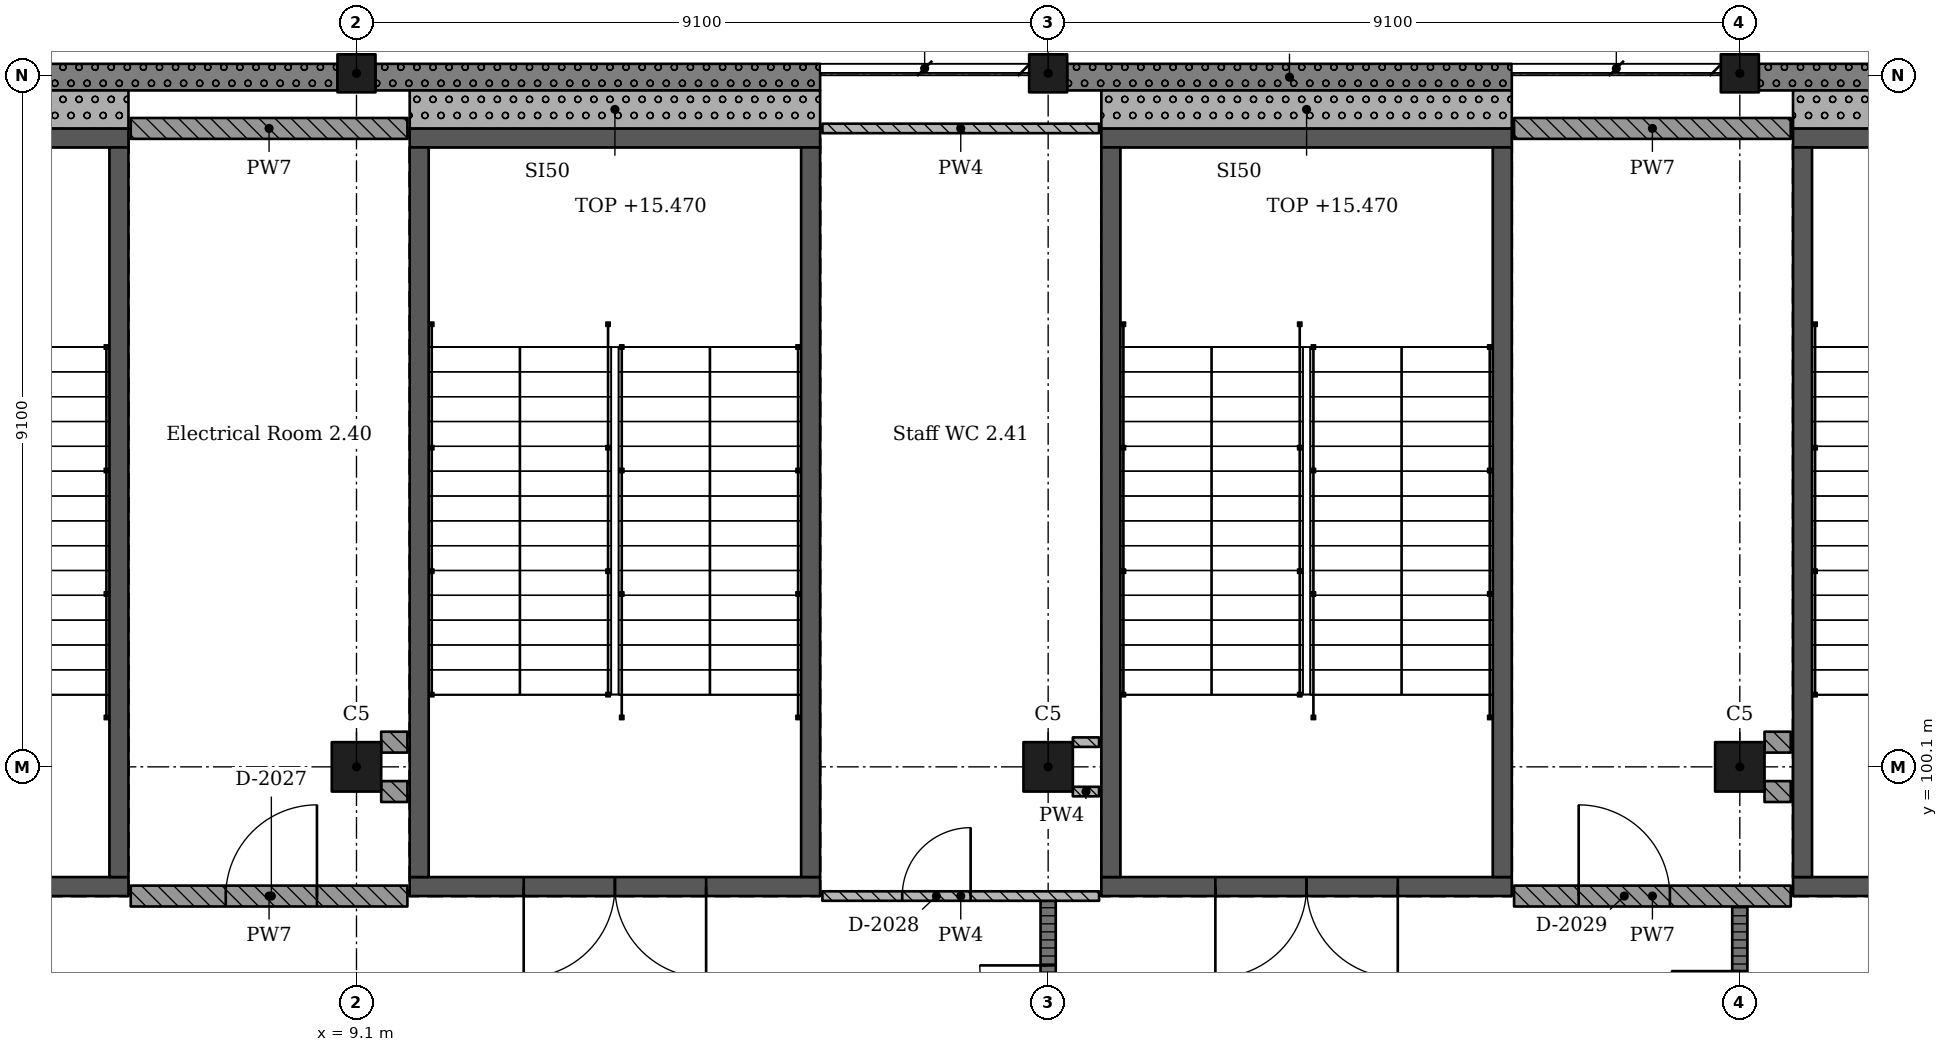
"""IFC4 building model, lengths in metres.
Left out: names, types, materials, properties, quantities, classifications, styles, units other than length and angle.
Written with IfcOpenShell. Run it as: python <this file> out.ifc"""

import sys

from ifc_helpers import new_model, si_unit, direction, frame, frame_2d, origin, origin_2d, place, context, subcontext, project, spatial, rectangle, extrude, element, fill, save


model = new_model("IFC4")
c1 = context("Model", 3, precision=1e-05, world=origin(), true_north=direction((0.0, 1.0)))
c2 = subcontext(c1, "Body", "Model", "MODEL_VIEW")
j1 = project(units=[si_unit("LENGTHUNIT", "METRE"), si_unit("PLANEANGLEUNIT", "RADIAN")], contexts=[c1])
p1 = place(None, origin())
s1 = spatial("IfcSite", under=j1, at=p1, CompositionType="ELEMENT")
p2 = place(p1, origin())
s2 = spatial("IfcBuilding", under=s1, at=p2, CompositionType="ELEMENT")
p3 = place(p2, frame((0.0, 0.0, 10.92)))
s3 = spatial("IfcBuildingStorey", under=s2, at=p3, CompositionType="ELEMENT", Elevation=10.92)
p4 = place(p3, frame((9.1, 100.1, 0.0), z_axis=(0.0, 0.0, 1.0), x_axis=(1.0, 0.0, 0.0)))
e1 = element("IfcColumn", 1, at=p4, inside=s3, PredefinedType="COLUMN", context=c2, shape_type="SweptSolid", body=[
    extrude(rectangle(XDim=0.65, YDim=0.65, at=origin_2d()), origin(), (0.0, 0.0, 1.0), 4.55),
])
p5 = place(p3, frame((9.1, 109.225, 0.0), z_axis=(0.0, 0.0, 1.0), x_axis=(1.0, 0.0, 0.0)))
e2 = element("IfcColumn", 2, at=p5, inside=s3, PredefinedType="COLUMN", context=c2, shape_type="SweptSolid", body=[
    extrude(rectangle(XDim=0.5, YDim=0.5, at=origin_2d()), origin(), (0.0, 0.0, 1.0), 4.55),
])
p6 = place(p3, frame((18.2, 100.1, 0.0), z_axis=(0.0, 0.0, 1.0), x_axis=(1.0, 0.0, 0.0)))
e3 = element("IfcColumn", 3, at=p6, inside=s3, PredefinedType="COLUMN", context=c2, shape_type="SweptSolid", body=[
    extrude(rectangle(XDim=0.65, YDim=0.65, at=origin_2d()), origin(), (0.0, 0.0, 1.0), 4.55),
])
p7 = place(p3, frame((18.2, 109.225, 0.0), z_axis=(0.0, 0.0, 1.0), x_axis=(1.0, 0.0, 0.0)))
e4 = element("IfcColumn", 4, at=p7, inside=s3, PredefinedType="COLUMN", context=c2, shape_type="SweptSolid", body=[
    extrude(rectangle(XDim=0.5, YDim=0.5, at=origin_2d()), origin(), (0.0, 0.0, 1.0), 4.55),
])
p8 = place(p3, frame((27.3, 100.1, 0.0), z_axis=(0.0, 0.0, 1.0), x_axis=(1.0, 0.0, 0.0)))
e5 = element("IfcColumn", 5, at=p8, inside=s3, PredefinedType="COLUMN", context=c2, shape_type="SweptSolid", body=[
    extrude(rectangle(XDim=0.65, YDim=0.65, at=origin_2d()), origin(), (0.0, 0.0, 1.0), 4.55),
])
p9 = place(p3, frame((27.3, 109.225, 0.0), z_axis=(0.0, 0.0, 1.0), x_axis=(1.0, 0.0, 0.0)))
e6 = element("IfcColumn", 6, at=p9, inside=s3, PredefinedType="COLUMN", context=c2, shape_type="SweptSolid", body=[
    extrude(rectangle(XDim=0.5, YDim=0.5, at=origin_2d()), origin(), (0.0, 0.0, 1.0), 4.55),
])
p10 = place(p3, frame((6.1, 98.525, 0.0), z_axis=(0.0, 0.0, 1.0), x_axis=(-1.0, 0.0, 0.0)))
e7 = element("IfcWall", 7, at=p10, inside=s3, PredefinedType="SHEAR", context=c2, shape_type="SweptSolid", body=[
    extrude(rectangle(XDim=5.4, YDim=0.25, at=frame_2d((2.7, 0.0))), origin(), (0.0, 0.0, 1.0), 4.55),
])
p11 = place(p10, frame((1.5, 0.0, 0.0)))
e8 = element("IfcOpeningElement", 8, at=p11, cuts=e7, PredefinedType="OPENING", context=c2, shape_type="SweptSolid", body=[
    extrude(rectangle(XDim=2.4, YDim=2.1, at=frame_2d((1.2, 1.05))), frame((0.0, 0.135, 0.0), z_axis=(0.0, -1.0, 0.0), x_axis=(1.0, 0.0, 0.0)), (0.0, 0.0, 1.0), 0.27),
])
p12 = place(p3, frame((6.1, 108.375, 0.0), z_axis=(0.0, 0.0, 1.0), x_axis=(-1.0, 0.0, 0.0)))
e9 = element("IfcWall", 9, at=p12, inside=s3, PredefinedType="SHEAR", context=c2, shape_type="SweptSolid", body=[
    extrude(rectangle(XDim=5.4, YDim=0.25, at=frame_2d((2.7, 0.0))), origin(), (0.0, 0.0, 1.0), 4.55),
])
p13 = place(p3, frame((5.975, 108.25, 0.0), z_axis=(0.0, 0.0, 1.0), x_axis=(0.0, -1.0, 0.0)))
e10 = element("IfcWall", 10, at=p13, inside=s3, PredefinedType="SHEAR", context=c2, shape_type="SweptSolid", body=[
    extrude(rectangle(XDim=9.6, YDim=0.25, at=frame_2d((4.8, 0.0))), origin(), (0.0, 0.0, 1.0), 4.55),
])
p14 = place(p3, frame((15.2, 98.525, 0.0), z_axis=(0.0, 0.0, 1.0), x_axis=(-1.0, 0.0, 0.0)))
e11 = element("IfcWall", 11, at=p14, inside=s3, PredefinedType="SHEAR", context=c2, shape_type="SweptSolid", body=[
    extrude(rectangle(XDim=5.4, YDim=0.25, at=frame_2d((2.7, 0.0))), origin(), (0.0, 0.0, 1.0), 4.55),
])
p15 = place(p14, frame((1.5, 0.0, 0.0)))
e12 = element("IfcOpeningElement", 12, at=p15, cuts=e11, PredefinedType="OPENING", context=c2, shape_type="SweptSolid", body=[
    extrude(rectangle(XDim=2.4, YDim=2.1, at=frame_2d((1.2, 1.05))), frame((0.0, 0.135, 0.0), z_axis=(0.0, -1.0, 0.0), x_axis=(1.0, 0.0, 0.0)), (0.0, 0.0, 1.0), 0.27),
])
p16 = place(p3, frame((15.2, 108.375, 0.0), z_axis=(0.0, 0.0, 1.0), x_axis=(-1.0, 0.0, 0.0)))
e13 = element("IfcWall", 13, at=p16, inside=s3, PredefinedType="SHEAR", context=c2, shape_type="SweptSolid", body=[
    extrude(rectangle(XDim=5.4, YDim=0.25, at=frame_2d((2.7, 0.0))), origin(), (0.0, 0.0, 1.0), 4.55),
])
for number, where, z_axis, x_axis in (
    (14, (9.925, 108.25, 0.0), (0.0, 0.0, 1.0), (0.0, -1.0, 0.0)),
    (15, (15.075, 108.25, 0.0), (0.0, 0.0, 1.0), (0.0, -1.0, 0.0)),
):
    element("IfcWall", number, at=place(p3, frame(where, z_axis=z_axis, x_axis=x_axis)), inside=s3, PredefinedType="SHEAR", context=c2, shape_type="SweptSolid", body=[
        extrude(rectangle(XDim=9.6, YDim=0.25, at=frame_2d((4.8, 0.0))), origin(), (0.0, 0.0, 1.0), 4.55),
    ])
p17 = place(p3, frame((24.3, 98.525, 0.0), z_axis=(0.0, 0.0, 1.0), x_axis=(-1.0, 0.0, 0.0)))
e16 = element("IfcWall", 16, at=p17, inside=s3, PredefinedType="SHEAR", context=c2, shape_type="SweptSolid", body=[
    extrude(rectangle(XDim=5.4, YDim=0.25, at=frame_2d((2.7, 0.0))), origin(), (0.0, 0.0, 1.0), 4.55),
])
p18 = place(p17, frame((1.5, 0.0, 0.0)))
e17 = element("IfcOpeningElement", 17, at=p18, cuts=e16, PredefinedType="OPENING", context=c2, shape_type="SweptSolid", body=[
    extrude(rectangle(XDim=2.4, YDim=2.1, at=frame_2d((1.2, 1.05))), frame((0.0, 0.135, 0.0), z_axis=(0.0, -1.0, 0.0), x_axis=(1.0, 0.0, 0.0)), (0.0, 0.0, 1.0), 0.27),
])
p19 = place(p3, frame((24.3, 108.375, 0.0), z_axis=(0.0, 0.0, 1.0), x_axis=(-1.0, 0.0, 0.0)))
e18 = element("IfcWall", 18, at=p19, inside=s3, PredefinedType="SHEAR", context=c2, shape_type="SweptSolid", body=[
    extrude(rectangle(XDim=5.4, YDim=0.25, at=frame_2d((2.7, 0.0))), origin(), (0.0, 0.0, 1.0), 4.55),
])
for number, where, z_axis, x_axis in (
    (19, (19.025, 108.25, 0.0), (0.0, 0.0, 1.0), (0.0, -1.0, 0.0)),
    (20, (24.175, 108.25, 0.0), (0.0, 0.0, 1.0), (0.0, -1.0, 0.0)),
):
    element("IfcWall", number, at=place(p3, frame(where, z_axis=z_axis, x_axis=x_axis)), inside=s3, PredefinedType="SHEAR", context=c2, shape_type="SweptSolid", body=[
        extrude(rectangle(XDim=9.6, YDim=0.25, at=frame_2d((4.8, 0.0))), origin(), (0.0, 0.0, 1.0), 4.55),
    ])
p20 = place(p3, frame((33.4, 98.525, 0.0), z_axis=(0.0, 0.0, 1.0), x_axis=(-1.0, 0.0, 0.0)))
e21 = element("IfcWall", 21, at=p20, inside=s3, PredefinedType="SHEAR", context=c2, shape_type="SweptSolid", body=[
    extrude(rectangle(XDim=5.4, YDim=0.25, at=frame_2d((2.7, 0.0))), origin(), (0.0, 0.0, 1.0), 4.55),
])
p21 = place(p20, frame((1.5, 0.0, 0.0)))
e22 = element("IfcOpeningElement", 22, at=p21, cuts=e21, PredefinedType="OPENING", context=c2, shape_type="SweptSolid", body=[
    extrude(rectangle(XDim=2.4, YDim=2.1, at=frame_2d((1.2, 1.05))), frame((0.0, 0.135, 0.0), z_axis=(0.0, -1.0, 0.0), x_axis=(1.0, 0.0, 0.0)), (0.0, 0.0, 1.0), 0.27),
])
p22 = place(p3, frame((33.4, 108.375, 0.0), z_axis=(0.0, 0.0, 1.0), x_axis=(-1.0, 0.0, 0.0)))
e23 = element("IfcWall", 23, at=p22, inside=s3, PredefinedType="SHEAR", context=c2, shape_type="SweptSolid", body=[
    extrude(rectangle(XDim=5.4, YDim=0.25, at=frame_2d((2.7, 0.0))), origin(), (0.0, 0.0, 1.0), 4.55),
])
p23 = place(p3, frame((28.125, 108.25, 0.0), z_axis=(0.0, 0.0, 1.0), x_axis=(0.0, -1.0, 0.0)))
e24 = element("IfcWall", 24, at=p23, inside=s3, PredefinedType="SHEAR", context=c2, shape_type="SweptSolid", body=[
    extrude(rectangle(XDim=9.6, YDim=0.25, at=frame_2d((4.8, 0.0))), origin(), (0.0, 0.0, 1.0), 4.55),
])
p24 = place(p3, frame((33.4, 109.175, 0.0), z_axis=(0.0, 0.0, 1.0), x_axis=(-1.0, 0.0, 0.0)))
e25 = element("IfcWall", 25, at=p24, inside=s3, PredefinedType="SOLIDWALL", context=c2, shape_type="SweptSolid", body=[
    extrude(rectangle(XDim=5.85, YDim=0.35, at=frame_2d((2.925, 0.0))), origin(), (0.0, 0.0, 1.0), 3.5),
])
p25 = place(p3, frame((24.3, 109.175, 0.0), z_axis=(0.0, 0.0, 1.0), x_axis=(-1.0, 0.0, 0.0)))
e26 = element("IfcWall", 26, at=p25, inside=s3, PredefinedType="SOLIDWALL", context=c2, shape_type="SweptSolid", body=[
    extrude(rectangle(XDim=5.85, YDim=0.35, at=frame_2d((2.925, 0.0))), origin(), (0.0, 0.0, 1.0), 3.5),
])
p26 = place(p3, frame((15.2, 109.175, 0.0), z_axis=(0.0, 0.0, 1.0), x_axis=(-1.0, 0.0, 0.0)))
e27 = element("IfcWall", 27, at=p26, inside=s3, PredefinedType="SOLIDWALL", context=c2, shape_type="SweptSolid", body=[
    extrude(rectangle(XDim=5.85, YDim=0.35, at=frame_2d((2.925, 0.0))), origin(), (0.0, 0.0, 1.0), 3.5),
])
p27 = place(p3, frame((8.85, 109.175, 0.0), z_axis=(0.0, 0.0, 1.0), x_axis=(-1.0, 0.0, 0.0)))
e28 = element("IfcWall", 28, at=p27, inside=s3, PredefinedType="SOLIDWALL", context=c2, shape_type="SweptSolid", body=[
    extrude(rectangle(XDim=8.6, YDim=0.35, at=frame_2d((4.3, 0.0))), origin(), (0.0, 0.0, 1.0), 3.5),
])
p28 = place(p3, frame((0.7, 108.75, 0.0), z_axis=(0.0, 0.0, 1.0), x_axis=(1.0, 0.0, 0.0)))
e29 = element("IfcWall", 29, at=p28, inside=s3, PredefinedType="SOLIDWALL", context=c2, shape_type="SweptSolid", body=[
    extrude(rectangle(XDim=5.4, YDim=0.5, at=frame_2d((2.7, 0.0))), origin(), (0.0, 0.0, 1.0), 4.55),
])
p29 = place(p3, frame((9.8, 108.75, 0.0), z_axis=(0.0, 0.0, 1.0), x_axis=(1.0, 0.0, 0.0)))
e30 = element("IfcWall", 30, at=p29, inside=s3, PredefinedType="SOLIDWALL", context=c2, shape_type="SweptSolid", body=[
    extrude(rectangle(XDim=5.4, YDim=0.5, at=frame_2d((2.7, 0.0))), origin(), (0.0, 0.0, 1.0), 4.55),
])
p30 = place(p3, frame((18.9, 108.75, 0.0), z_axis=(0.0, 0.0, 1.0), x_axis=(1.0, 0.0, 0.0)))
e31 = element("IfcWall", 31, at=p30, inside=s3, PredefinedType="SOLIDWALL", context=c2, shape_type="SweptSolid", body=[
    extrude(rectangle(XDim=5.4, YDim=0.5, at=frame_2d((2.7, 0.0))), origin(), (0.0, 0.0, 1.0), 4.55),
])
p31 = place(p3, frame((28.0, 108.75, 0.0), z_axis=(0.0, 0.0, 1.0), x_axis=(1.0, 0.0, 0.0)))
e32 = element("IfcWall", 32, at=p31, inside=s3, PredefinedType="SOLIDWALL", context=c2, shape_type="SweptSolid", body=[
    extrude(rectangle(XDim=5.4, YDim=0.5, at=frame_2d((2.7, 0.0))), origin(), (0.0, 0.0, 1.0), 4.55),
])
p32 = place(p3, frame((6.13, 98.4, 0.0), z_axis=(0.0, 0.0, 1.0), x_axis=(1.0, 0.0, 0.0)))
e33 = element("IfcWall", 33, at=p32, inside=s3, PredefinedType="SOLIDWALL", context=c2, shape_type="SweptSolid", body=[
    extrude(rectangle(XDim=3.64, YDim=0.275, at=frame_2d((1.82, 0.0))), origin(), (0.0, 0.0, 1.0), 4.25),
])
p33 = place(p32, frame((1.25, 0.0, 0.0)))
e34 = element("IfcOpeningElement", 34, at=p33, cuts=e33, PredefinedType="OPENING", context=c2, shape_type="SweptSolid", body=[
    extrude(rectangle(XDim=1.2, YDim=2.4, at=frame_2d((0.6, 1.2))), frame((0.0, 0.147, 0.0), z_axis=(0.0, -1.0, 0.0), x_axis=(1.0, 0.0, 0.0)), (0.0, 0.0, 1.0), 0.295),
])
p34 = place(p3, frame((6.13, 108.5, 0.0), z_axis=(0.0, 0.0, 1.0), x_axis=(1.0, 0.0, 0.0)))
e35 = element("IfcWall", 35, at=p34, inside=s3, PredefinedType="SOLIDWALL", context=c2, shape_type="SweptSolid", body=[
    extrude(rectangle(XDim=3.64, YDim=0.275, at=frame_2d((1.82, 0.0))), origin(), (0.0, 0.0, 1.0), 4.25),
])
for number, where, z_axis, x_axis in (
    (36, (9.425, 99.775, 0.0), (0.0, 0.0, 1.0), (1.0, 0.0, 0.0)),
    (37, (9.77, 100.425, 0.0), (0.0, 0.0, 1.0), (-1.0, 0.0, 0.0)),
):
    element("IfcWall", number, at=place(p3, frame(where, z_axis=z_axis, x_axis=x_axis)), inside=s3, PredefinedType="SOLIDWALL", context=c2, shape_type="SweptSolid", body=[
        extrude(rectangle(XDim=0.345, YDim=0.275, at=frame_2d((0.172, 0.0))), origin(), (0.0, 0.0, 1.0), 4.25),
    ])
p35 = place(p3, frame((15.23, 98.4, 0.0), z_axis=(0.0, 0.0, 1.0), x_axis=(1.0, 0.0, 0.0)))
e38 = element("IfcWall", 38, at=p35, inside=s3, PredefinedType="PARTITIONING", context=c2, shape_type="SweptSolid", body=[
    extrude(rectangle(XDim=3.64, YDim=0.125, at=frame_2d((1.82, 0.0))), origin(), (0.0, 0.0, 1.0), 4.25),
])
p36 = place(p35, frame((1.05, 0.0, 0.0)))
e39 = element("IfcOpeningElement", 39, at=p36, cuts=e38, PredefinedType="OPENING", context=c2, shape_type="SweptSolid", body=[
    extrude(rectangle(XDim=0.9, YDim=2.1, at=frame_2d((0.45, 1.05))), frame((0.0, 0.073, 0.0), z_axis=(0.0, -1.0, 0.0), x_axis=(1.0, 0.0, 0.0)), (0.0, 0.0, 1.0), 0.145),
])
p37 = place(p3, frame((15.23, 108.5, 0.0), z_axis=(0.0, 0.0, 1.0), x_axis=(1.0, 0.0, 0.0)))
e40 = element("IfcWall", 40, at=p37, inside=s3, PredefinedType="PARTITIONING", context=c2, shape_type="SweptSolid", body=[
    extrude(rectangle(XDim=3.64, YDim=0.125, at=frame_2d((1.82, 0.0))), origin(), (0.0, 0.0, 1.0), 4.25),
])
p38 = place(p3, frame((18.2, 98.337, 0.0), z_axis=(0.0, 0.0, 1.0), x_axis=(0.0, -1.0, 0.0)))
e41 = element("IfcWall", 41, at=p38, inside=s3, PredefinedType="PARTITIONING", context=c2, shape_type="SweptSolid", body=[
    extrude(rectangle(XDim=6.938, YDim=0.2, at=frame_2d((3.469, 0.0))), origin(), (0.0, 0.0, 1.0), 3.55),
])
p39 = place(p38, frame((0.85, 0.0, 0.0)))
e42 = element("IfcOpeningElement", 42, at=p39, cuts=e41, PredefinedType="OPENING", context=c2, shape_type="SweptSolid", body=[
    extrude(rectangle(XDim=1.8, YDim=2.4, at=frame_2d((0.9, 1.2))), frame((0.0, 0.11, 0.0), z_axis=(0.0, -1.0, 0.0), x_axis=(1.0, 0.0, 0.0)), (0.0, 0.0, 1.0), 0.22),
])
p40 = place(p38, frame((4.35, 0.0, 0.0)))
e43 = element("IfcOpeningElement", 43, at=p40, cuts=e41, PredefinedType="OPENING", context=c2, shape_type="SweptSolid", body=[
    extrude(rectangle(XDim=1.8, YDim=2.4, at=frame_2d((0.9, 1.2))), frame((0.0, 0.11, 0.0), z_axis=(0.0, -1.0, 0.0), x_axis=(1.0, 0.0, 0.0)), (0.0, 0.0, 1.0), 0.22),
])
for number, where, z_axis, x_axis in (
    (44, (18.525, 99.775, 0.0), (0.0, 0.0, 1.0), (1.0, 0.0, 0.0)),
    (45, (18.87, 100.425, 0.0), (0.0, 0.0, 1.0), (-1.0, 0.0, 0.0)),
):
    element("IfcWall", number, at=place(p3, frame(where, z_axis=z_axis, x_axis=x_axis)), inside=s3, PredefinedType="PARTITIONING", context=c2, shape_type="SweptSolid", body=[
        extrude(rectangle(XDim=0.345, YDim=0.125, at=frame_2d((0.173, 0.0))), origin(), (0.0, 0.0, 1.0), 4.25),
    ])
p41 = place(p3, frame((24.33, 98.4, 0.0), z_axis=(0.0, 0.0, 1.0), x_axis=(1.0, 0.0, 0.0)))
e46 = element("IfcWall", 46, at=p41, inside=s3, PredefinedType="SOLIDWALL", context=c2, shape_type="SweptSolid", body=[
    extrude(rectangle(XDim=3.64, YDim=0.275, at=frame_2d((1.82, 0.0))), origin(), (0.0, 0.0, 1.0), 4.25),
])
p42 = place(p41, frame((0.85, 0.0, 0.0)))
e47 = element("IfcOpeningElement", 47, at=p42, cuts=e46, PredefinedType="OPENING", context=c2, shape_type="SweptSolid", body=[
    extrude(rectangle(XDim=1.2, YDim=2.4, at=frame_2d((0.6, 1.2))), frame((0.0, 0.147, 0.0), z_axis=(0.0, -1.0, 0.0), x_axis=(1.0, 0.0, 0.0)), (0.0, 0.0, 1.0), 0.295),
])
p43 = place(p3, frame((24.33, 108.5, 0.0), z_axis=(0.0, 0.0, 1.0), x_axis=(1.0, 0.0, 0.0)))
e48 = element("IfcWall", 48, at=p43, inside=s3, PredefinedType="SOLIDWALL", context=c2, shape_type="SweptSolid", body=[
    extrude(rectangle(XDim=3.64, YDim=0.275, at=frame_2d((1.82, 0.0))), origin(), (0.0, 0.0, 1.0), 4.25),
])
p44 = place(p3, frame((27.3, 98.262, 0.0), z_axis=(0.0, 0.0, 1.0), x_axis=(0.0, -1.0, 0.0)))
e49 = element("IfcWall", 49, at=p44, inside=s3, PredefinedType="PARTITIONING", context=c2, shape_type="SweptSolid", body=[
    extrude(rectangle(XDim=6.863, YDim=0.2, at=frame_2d((3.431, 0.0))), origin(), (0.0, 0.0, 1.0), 3.55),
])
p45 = place(p44, frame((0.85, 0.0, 0.0)))
e50 = element("IfcOpeningElement", 50, at=p45, cuts=e49, PredefinedType="OPENING", context=c2, shape_type="SweptSolid", body=[
    extrude(rectangle(XDim=1.8, YDim=2.4, at=frame_2d((0.9, 1.2))), frame((0.0, 0.11, 0.0), z_axis=(0.0, -1.0, 0.0), x_axis=(1.0, 0.0, 0.0)), (0.0, 0.0, 1.0), 0.22),
])
p46 = place(p44, frame((4.25, 0.0, 0.0)))
e51 = element("IfcOpeningElement", 51, at=p46, cuts=e49, PredefinedType="OPENING", context=c2, shape_type="SweptSolid", body=[
    extrude(rectangle(XDim=1.8, YDim=2.4, at=frame_2d((0.9, 1.2))), frame((0.0, 0.11, 0.0), z_axis=(0.0, -1.0, 0.0), x_axis=(1.0, 0.0, 0.0)), (0.0, 0.0, 1.0), 0.22),
])
for number, where, z_axis, x_axis in (
    (52, (27.625, 99.775, 0.0), (0.0, 0.0, 1.0), (1.0, 0.0, 0.0)),
    (53, (27.97, 100.425, 0.0), (0.0, 0.0, 1.0), (-1.0, 0.0, 0.0)),
):
    element("IfcWall", number, at=place(p3, frame(where, z_axis=z_axis, x_axis=x_axis)), inside=s3, PredefinedType="SOLIDWALL", context=c2, shape_type="SweptSolid", body=[
        extrude(rectangle(XDim=0.345, YDim=0.275, at=frame_2d((0.172, 0.0))), origin(), (0.0, 0.0, 1.0), 4.25),
    ])
p47 = place(p33, origin())
e54 = element("IfcDoor", 54, at=p47, inside=s3, OperationType="SINGLE_SWING_LEFT", PredefinedType="DOOR", context=c2, shape_type="SweptSolid", body=[
    extrude(rectangle(XDim=1.2, YDim=2.4, at=frame_2d((0.6, 1.2))), frame((0.0, 0.025, 0.0), z_axis=(0.0, -1.0, 0.0), x_axis=(1.0, 0.0, 0.0)), (0.0, 0.0, 1.0), 0.05),
])
fill(e34, e54)
p48 = place(p36, origin())
e55 = element("IfcDoor", 55, at=p48, inside=s3, OperationType="SINGLE_SWING_LEFT", PredefinedType="DOOR", context=c2, shape_type="SweptSolid", body=[
    extrude(rectangle(XDim=0.9, YDim=2.1, at=frame_2d((0.45, 1.05))), frame((0.0, 0.025, 0.0), z_axis=(0.0, -1.0, 0.0), x_axis=(1.0, 0.0, 0.0)), (0.0, 0.0, 1.0), 0.05),
])
fill(e39, e55)
p49 = place(p42, origin())
e56 = element("IfcDoor", 56, at=p49, inside=s3, OperationType="SINGLE_SWING_RIGHT", PredefinedType="DOOR", context=c2, shape_type="SweptSolid", body=[
    extrude(rectangle(XDim=1.2, YDim=2.4, at=frame_2d((0.6, 1.2))), frame((0.0, 0.025, 0.0), z_axis=(0.0, -1.0, 0.0), x_axis=(1.0, 0.0, 0.0)), (0.0, 0.0, 1.0), 0.05),
])
fill(e47, e56)
p50 = place(p39, origin())
e57 = element("IfcDoor", 57, at=p50, inside=s3, OperationType="DOUBLE_DOOR_SINGLE_SWING", PredefinedType="DOOR", context=c2, shape_type="SweptSolid", body=[
    extrude(rectangle(XDim=1.8, YDim=2.4, at=frame_2d((0.9, 1.2))), frame((0.0, 0.025, 0.0), z_axis=(0.0, -1.0, 0.0), x_axis=(1.0, 0.0, 0.0)), (0.0, 0.0, 1.0), 0.05),
])
fill(e42, e57)
p51 = place(p45, origin())
e58 = element("IfcDoor", 58, at=p51, inside=s3, OperationType="DOUBLE_DOOR_SINGLE_SWING", PredefinedType="DOOR", context=c2, shape_type="SweptSolid", body=[
    extrude(rectangle(XDim=1.8, YDim=2.4, at=frame_2d((0.9, 1.2))), frame((0.0, 0.025, 0.0), z_axis=(0.0, -1.0, 0.0), x_axis=(1.0, 0.0, 0.0)), (0.0, 0.0, 1.0), 0.05),
])
fill(e50, e58)
p52 = place(p15, origin())
e59 = element("IfcDoor", 59, at=p52, inside=s3, OperationType="DOUBLE_DOOR_SINGLE_SWING", PredefinedType="DOOR", context=c2, shape_type="SweptSolid", body=[
    extrude(rectangle(XDim=2.4, YDim=2.1, at=frame_2d((1.2, 1.05))), frame((0.0, 0.025, 0.0), z_axis=(0.0, -1.0, 0.0), x_axis=(1.0, 0.0, 0.0)), (0.0, 0.0, 1.0), 0.05),
])
fill(e12, e59)
p53 = place(p18, origin())
e60 = element("IfcDoor", 60, at=p53, inside=s3, OperationType="DOUBLE_DOOR_SINGLE_SWING", PredefinedType="DOOR", context=c2, shape_type="SweptSolid", body=[
    extrude(rectangle(XDim=2.4, YDim=2.1, at=frame_2d((1.2, 1.05))), frame((0.0, 0.025, 0.0), z_axis=(0.0, -1.0, 0.0), x_axis=(1.0, 0.0, 0.0)), (0.0, 0.0, 1.0), 0.05),
])
fill(e17, e60)
save(model, sys.argv[1])
